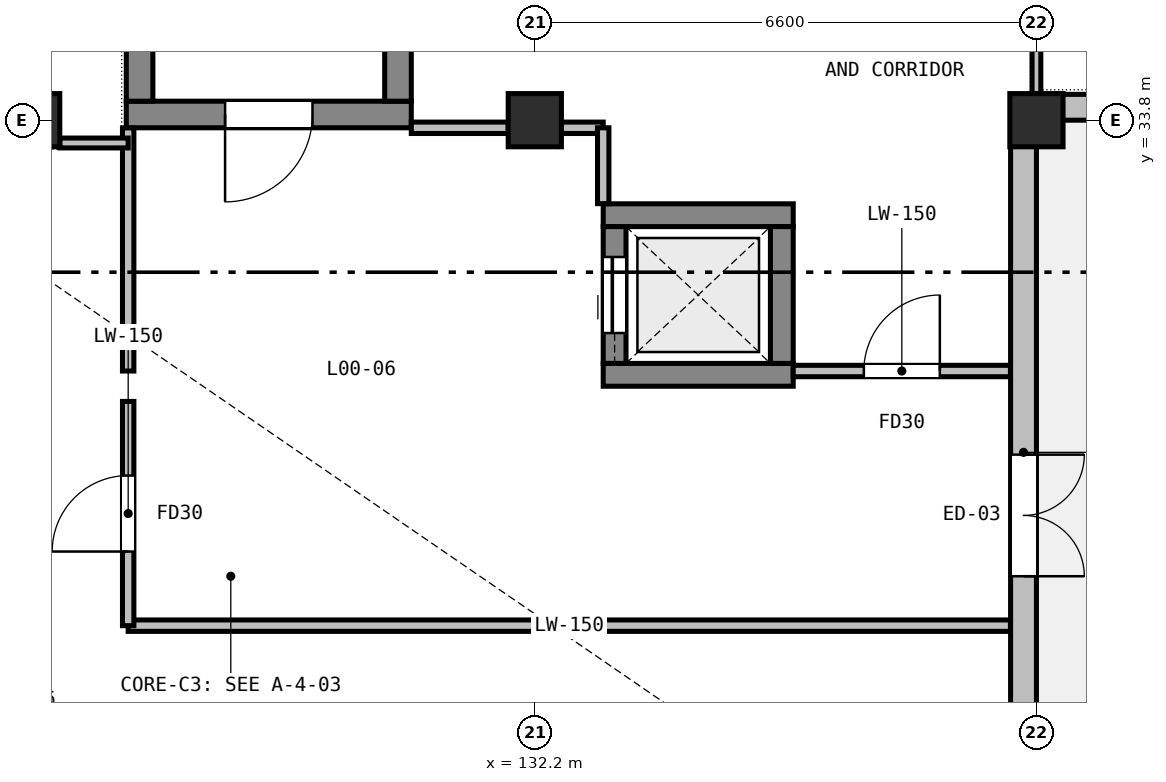
"""IFC4 building model, lengths in metres.
Left out: names, types, materials, properties, quantities, classifications, styles, units other than length and angle.
Written with IfcOpenShell. Run it as: python <this file> out.ifc"""

import sys

from ifc_helpers import new_model, si_unit, direction, frame, frame_2d, origin, origin_2d, place, context, subcontext, project, spatial, rectangle, extrude, element, fill, save


model = new_model("IFC4")
c1 = context("Model", 3, precision=1e-05, world=origin(), true_north=direction((0.0, 1.0)))
c2 = subcontext(c1, "Body", "Model", "MODEL_VIEW")
j1 = project(units=[si_unit("LENGTHUNIT", "METRE"), si_unit("PLANEANGLEUNIT", "RADIAN")], contexts=[c1])
p1 = place(None, origin())
s1 = spatial("IfcSite", under=j1, at=p1, CompositionType="ELEMENT")
p2 = place(p1, origin())
s2 = spatial("IfcBuilding", under=s1, at=p2, CompositionType="ELEMENT")
p3 = place(p2, origin())
s3 = spatial("IfcBuildingStorey", under=s2, at=p3, CompositionType="ELEMENT", Elevation=0.0)
for number, where, z_axis, x_axis in (
    (1, (125.6, 33.8, 0.0), (0.0, 0.0, 1.0), (1.0, 0.0, 0.0)),
    (2, (132.2, 33.8, 0.0), (0.0, 0.0, 1.0), (1.0, 0.0, 0.0)),
    (3, (138.8, 33.8, 0.0), (0.0, 0.0, 1.0), (1.0, 0.0, 0.0)),
):
    element("IfcColumn", number, at=place(p3, frame(where, z_axis=z_axis, x_axis=x_axis)), inside=s3, PredefinedType="COLUMN", context=c2, shape_type="SweptSolid", body=[
        extrude(rectangle(XDim=0.7, YDim=0.7, at=origin_2d()), origin(), (0.0, 0.0, 1.0), 5.4),
    ])
p4 = place(p3, frame((130.575, 33.875, 0.0), z_axis=(0.0, 0.0, 1.0), x_axis=(-1.0, 0.0, 0.0)))
e4 = element("IfcWall", 4, at=p4, inside=s3, PredefinedType="SHEAR", context=c2, shape_type="SweptSolid", body=[
    extrude(rectangle(XDim=3.75, YDim=0.35, at=frame_2d((1.875, 0.0))), origin(), (0.0, 0.0, 1.0), 5.4),
])
p5 = place(p4, frame((1.3, 0.0, 0.0)))
e5 = element("IfcOpeningElement", 5, at=p5, cuts=e4, PredefinedType="OPENING", context=c2, shape_type="SweptSolid", body=[
    extrude(rectangle(XDim=1.15, YDim=2.15, at=frame_2d((0.575, 1.075))), frame((0.0, 0.185, 0.0), z_axis=(0.0, -1.0, 0.0), x_axis=(1.0, 0.0, 0.0)), (0.0, 0.0, 1.0), 0.37),
])
for number, where, z_axis, x_axis in (
    (6, (127.0, 34.05, 0.0), (0.0, 0.0, 1.0), (0.0, 1.0, 0.0)),
    (7, (130.4, 34.05, 0.0), (0.0, 0.0, 1.0), (0.0, 1.0, 0.0)),
):
    element("IfcWall", number, at=place(p3, frame(where, z_axis=z_axis, x_axis=x_axis)), inside=s3, PredefinedType="SHEAR", context=c2, shape_type="SweptSolid", body=[
        extrude(rectangle(XDim=7.275, YDim=0.35, at=frame_2d((3.637, 0.0))), origin(), (0.0, 0.0, 1.0), 5.4),
    ])
for number, where, z_axis, x_axis in (
    (8, (133.1, 30.45, 0.0), (0.0, 0.0, 1.0), (1.0, 0.0, 0.0)),
    (9, (133.1, 32.55, 0.0), (0.0, 0.0, 1.0), (1.0, 0.0, 0.0)),
):
    element("IfcWall", number, at=place(p3, frame(where, z_axis=z_axis, x_axis=x_axis)), inside=s3, PredefinedType="SHEAR", context=c2, shape_type="SweptSolid", body=[
        extrude(rectangle(XDim=2.5, YDim=0.3, at=frame_2d((1.25, 0.0))), origin(), (0.0, 0.0, 1.0), 5.4),
    ])
p6 = place(p3, frame((133.25, 30.6, 0.0), z_axis=(0.0, 0.0, 1.0), x_axis=(0.0, 1.0, 0.0)))
e10 = element("IfcWall", 10, at=p6, inside=s3, PredefinedType="SHEAR", context=c2, shape_type="SweptSolid", body=[
    extrude(rectangle(XDim=1.8, YDim=0.3, at=frame_2d((0.9, 0.0))), origin(), (0.0, 0.0, 1.0), 5.4),
])
p7 = place(p6, frame((0.4, 0.0, 0.0)))
e11 = element("IfcOpeningElement", 11, at=p7, cuts=e10, PredefinedType="OPENING", context=c2, shape_type="SweptSolid", body=[
    extrude(rectangle(XDim=1.0, YDim=2.1, at=frame_2d((0.5, 1.05))), frame((0.0, 0.16, 0.0), z_axis=(0.0, -1.0, 0.0), x_axis=(1.0, 0.0, 0.0)), (0.0, 0.0, 1.0), 0.32),
])
p8 = place(p3, frame((135.45, 30.6, 0.0), z_axis=(0.0, 0.0, 1.0), x_axis=(0.0, 1.0, 0.0)))
e12 = element("IfcWall", 12, at=p8, inside=s3, PredefinedType="SHEAR", context=c2, shape_type="SweptSolid", body=[
    extrude(rectangle(XDim=1.8, YDim=0.3, at=frame_2d((0.9, 0.0))), origin(), (0.0, 0.0, 1.0), 5.4),
])
p9 = place(p3, frame((145.4, 33.97, 0.0), z_axis=(0.0, 0.0, 1.0), x_axis=(-1.0, 0.0, 0.0)))
e13 = element("IfcWall", 13, at=p9, inside=s3, PredefinedType="STANDARD", context=c2, shape_type="SweptSolid", body=[
    extrude(rectangle(XDim=6.6, YDim=0.34, at=frame_2d((3.3, 0.0))), origin(), (0.0, 0.0, 1.0), 4.535),
])
p10 = place(p9, frame((1.032, 0.0, 0.9)))
e14 = element("IfcOpeningElement", 14, at=p10, cuts=e13, PredefinedType="OPENING", context=c2, shape_type="SweptSolid", body=[
    extrude(rectangle(XDim=1.5, YDim=2.1, at=frame_2d((0.75, 1.05))), frame((0.0, 0.18, 0.0), z_axis=(0.0, -1.0, 0.0), x_axis=(1.0, 0.0, 0.0)), (0.0, 0.0, 1.0), 0.36),
])
p11 = place(p9, frame((4.068, 0.0, 0.9)))
e15 = element("IfcOpeningElement", 15, at=p11, cuts=e13, PredefinedType="OPENING", context=c2, shape_type="SweptSolid", body=[
    extrude(rectangle(XDim=1.5, YDim=2.1, at=frame_2d((0.75, 1.05))), frame((0.0, 0.18, 0.0), z_axis=(0.0, -1.0, 0.0), x_axis=(1.0, 0.0, 0.0)), (0.0, 0.0, 1.0), 0.36),
])
p12 = place(p3, frame((138.63, 33.46, 0.0), z_axis=(0.0, 0.0, 1.0), x_axis=(0.0, -1.0, 0.0)))
e16 = element("IfcWall", 16, at=p12, inside=s3, PredefinedType="STANDARD", context=c2, shape_type="SweptSolid", body=[
    extrude(rectangle(XDim=8.06, YDim=0.34, at=frame_2d((4.03, 0.0))), origin(), (0.0, 0.0, 1.0), 4.685),
])
p13 = place(p12, frame((4.06, 0.0, 0.0)))
e17 = element("IfcOpeningElement", 17, at=p13, cuts=e16, PredefinedType="OPENING", context=c2, shape_type="SweptSolid", body=[
    extrude(rectangle(XDim=1.6, YDim=2.2, at=frame_2d((0.8, 1.1))), frame((0.0, 0.18, 0.0), z_axis=(0.0, -1.0, 0.0), x_axis=(1.0, 0.0, 0.0)), (0.0, 0.0, 1.0), 0.36),
])
p14 = place(p3, frame((126.85, 30.5, 0.0), z_axis=(0.0, 0.0, 1.0), x_axis=(0.0, 1.0, 0.0)))
e18 = element("IfcWall", 18, at=p14, inside=s3, PredefinedType="PARTITIONING", context=c2, shape_type="SweptSolid", body=[
    extrude(rectangle(XDim=3.198, YDim=0.15, at=frame_2d((1.599, 0.0))), origin(), (0.0, 0.0, 1.0), 4.735),
])
p15 = place(p3, frame((130.575, 33.7, 0.0), z_axis=(0.0, 0.0, 1.0), x_axis=(1.0, 0.0, 0.0)))
e19 = element("IfcWall", 19, at=p15, inside=s3, PredefinedType="PARTITIONING", context=c2, shape_type="SweptSolid", body=[
    extrude(rectangle(XDim=1.275, YDim=0.15, at=frame_2d((0.638, 0.0))), origin(), (0.0, 0.0, 1.0), 4.735),
])
p16 = place(p3, frame((132.55, 33.7, 0.0), z_axis=(0.0, 0.0, 1.0), x_axis=(1.0, 0.0, 0.0)))
e20 = element("IfcWall", 20, at=p16, inside=s3, PredefinedType="PARTITIONING", context=c2, shape_type="SweptSolid", body=[
    extrude(rectangle(XDim=0.55, YDim=0.15, at=frame_2d((0.275, 0.0))), origin(), (0.0, 0.0, 1.0), 4.735),
])
p17 = place(p3, frame((133.1, 33.7, 0.0), z_axis=(0.0, 0.0, 1.0), x_axis=(0.0, -1.0, 0.0)))
e21 = element("IfcWall", 21, at=p17, inside=s3, PredefinedType="PARTITIONING", context=c2, shape_type="SweptSolid", body=[
    extrude(rectangle(XDim=0.998, YDim=0.15, at=frame_2d((0.499, 0.0))), origin(), (0.0, 0.0, 1.0), 4.735),
])
p18 = place(p3, frame((135.6, 30.5, 0.0), z_axis=(0.0, 0.0, 1.0), x_axis=(1.0, 0.0, 0.0)))
e22 = element("IfcWall", 22, at=p18, inside=s3, PredefinedType="PARTITIONING", context=c2, shape_type="SweptSolid", body=[
    extrude(rectangle(XDim=2.858, YDim=0.15, at=frame_2d((1.429, 0.0))), origin(), (0.0, 0.0, 1.0), 4.885),
])
p19 = place(p18, frame((0.929, 0.0, 0.0)))
e23 = element("IfcOpeningElement", 23, at=p19, cuts=e22, PredefinedType="OPENING", context=c2, shape_type="SweptSolid", body=[
    extrude(rectangle(XDim=1.0, YDim=2.1, at=frame_2d((0.5, 1.05))), frame((0.0, 0.085, 0.0), z_axis=(0.0, -1.0, 0.0), x_axis=(1.0, 0.0, 0.0)), (0.0, 0.0, 1.0), 0.17),
])
p20 = place(p3, frame((138.458, 27.15, 0.0), z_axis=(0.0, 0.0, 1.0), x_axis=(-1.0, 0.0, 0.0)))
e24 = element("IfcWall", 24, at=p20, inside=s3, PredefinedType="PARTITIONING", context=c2, shape_type="SweptSolid", body=[
    extrude(rectangle(XDim=11.608, YDim=0.15, at=frame_2d((5.804, 0.0))), origin(), (0.0, 0.0, 1.0), 4.535),
])
p21 = place(p3, frame((126.85, 27.15, 0.0), z_axis=(0.0, 0.0, 1.0), x_axis=(0.0, 1.0, 0.0)))
e25 = element("IfcWall", 25, at=p21, inside=s3, PredefinedType="PARTITIONING", context=c2, shape_type="SweptSolid", body=[
    extrude(rectangle(XDim=2.95, YDim=0.15, at=frame_2d((1.475, 0.0))), origin(), (0.0, 0.0, 1.0), 5.095),
])
p22 = place(p21, frame((0.975, 0.0, 0.0)))
e26 = element("IfcOpeningElement", 26, at=p22, cuts=e25, PredefinedType="OPENING", context=c2, shape_type="SweptSolid", body=[
    extrude(rectangle(XDim=1.0, YDim=2.1, at=frame_2d((0.5, 1.05))), frame((0.0, 0.085, 0.0), z_axis=(0.0, -1.0, 0.0), x_axis=(1.0, 0.0, 0.0)), (0.0, 0.0, 1.0), 0.17),
])
p23 = place(p3, frame((126.85, 33.5, 0.0), z_axis=(0.0, 0.0, 1.0), x_axis=(-1.0, 0.0, 0.0)))
e27 = element("IfcWall", 27, at=p23, inside=s3, PredefinedType="PARTITIONING", context=c2, shape_type="SweptSolid", body=[
    extrude(rectangle(XDim=0.9, YDim=0.13, at=frame_2d((0.45, 0.0))), origin(), (0.0, 0.0, 1.0), 4.535),
])
p24 = place(p3, frame((138.8, 34.15, 0.0), z_axis=(0.0, 0.0, 1.0), x_axis=(0.0, 1.0, 0.0)))
e28 = element("IfcWall", 28, at=p24, inside=s3, PredefinedType="PARTITIONING", context=c2, shape_type="SweptSolid", body=[
    extrude(rectangle(XDim=7.7, YDim=0.115, at=frame_2d((3.85, 0.0))), origin(), (0.0, 0.0, 1.0), 4.535),
])
p25 = place(p24, frame((3.0, 0.0, 0.0)))
e29 = element("IfcOpeningElement", 29, at=p25, cuts=e28, PredefinedType="OPENING", context=c2, shape_type="SweptSolid", body=[
    extrude(rectangle(XDim=1.7, YDim=2.14, at=frame_2d((0.85, 1.07))), frame((0.0, 0.067, 0.0), z_axis=(0.0, -1.0, 0.0), x_axis=(1.0, 0.0, 0.0)), (0.0, 0.0, 1.0), 0.135),
])
p26 = place(p13, origin())
e30 = element("IfcDoor", 30, at=p26, inside=s3, OperationType="DOUBLE_DOOR_SINGLE_SWING", PredefinedType="DOOR", context=c2, shape_type="SweptSolid", body=[
    extrude(rectangle(XDim=1.6, YDim=2.2, at=frame_2d((0.8, 1.1))), frame((0.0, 0.025, 0.0), z_axis=(0.0, -1.0, 0.0), x_axis=(1.0, 0.0, 0.0)), (0.0, 0.0, 1.0), 0.05),
])
fill(e17, e30)
p27 = place(p5, origin())
e31 = element("IfcDoor", 31, at=p27, inside=s3, OperationType="SINGLE_SWING_RIGHT", PredefinedType="DOOR", context=c2, shape_type="SweptSolid", body=[
    extrude(rectangle(XDim=1.15, YDim=2.15, at=frame_2d((0.575, 1.075))), frame((0.0, 0.025, 0.0), z_axis=(0.0, -1.0, 0.0), x_axis=(1.0, 0.0, 0.0)), (0.0, 0.0, 1.0), 0.05),
])
fill(e5, e31)
p28 = place(p7, origin())
e32 = element("IfcDoor", 32, at=p28, inside=s3, OperationType="SLIDING_TO_LEFT", PredefinedType="DOOR", context=c2, shape_type="SweptSolid", body=[
    extrude(rectangle(XDim=1.0, YDim=2.1, at=frame_2d((0.5, 1.05))), frame((0.0, 0.025, 0.0), z_axis=(0.0, -1.0, 0.0), x_axis=(1.0, 0.0, 0.0)), (0.0, 0.0, 1.0), 0.05),
])
fill(e11, e32)
p29 = place(p19, origin())
e33 = element("IfcDoor", 33, at=p29, inside=s3, OperationType="SINGLE_SWING_RIGHT", PredefinedType="DOOR", context=c2, shape_type="SweptSolid", body=[
    extrude(rectangle(XDim=1.0, YDim=2.1, at=frame_2d((0.5, 1.05))), frame((0.0, 0.025, 0.0), z_axis=(0.0, -1.0, 0.0), x_axis=(1.0, 0.0, 0.0)), (0.0, 0.0, 1.0), 0.05),
])
fill(e23, e33)
p30 = place(p22, origin())
e34 = element("IfcDoor", 34, at=p30, inside=s3, OperationType="SINGLE_SWING_LEFT", PredefinedType="DOOR", context=c2, shape_type="SweptSolid", body=[
    extrude(rectangle(XDim=1.0, YDim=2.1, at=frame_2d((0.5, 1.05))), frame((0.0, 0.025, 0.0), z_axis=(0.0, -1.0, 0.0), x_axis=(1.0, 0.0, 0.0)), (0.0, 0.0, 1.0), 0.05),
])
fill(e26, e34)
save(model, sys.argv[1])
